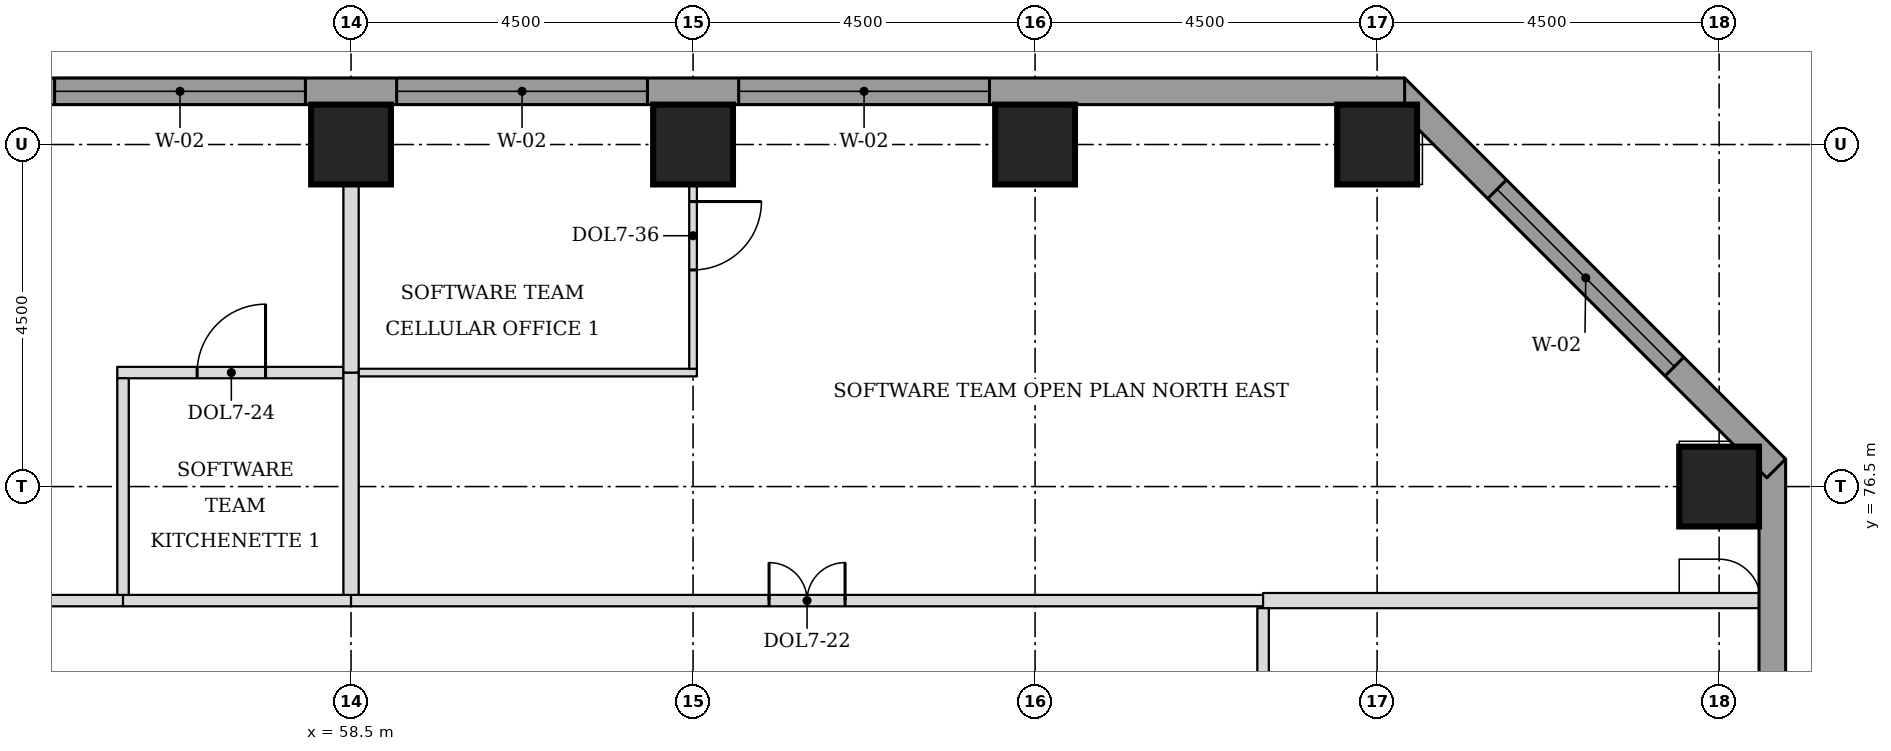
"""IFC4 building model, lengths in metres.
Left out: names, types, materials, properties, quantities, classifications, styles, units other than length and angle.
Written with IfcOpenShell. Run it as: python <this file> out.ifc"""

import sys

from ifc_helpers import new_model, si_unit, direction, frame, frame_2d, origin, origin_2d, place, context, subcontext, project, spatial, rectangle, extrude, element, fill, save


model = new_model("IFC4")
c1 = context("Model", 3, precision=1e-05, world=origin(), true_north=direction((0.0, 1.0)))
c2 = subcontext(c1, "Body", "Model", "MODEL_VIEW")
j1 = project(units=[si_unit("LENGTHUNIT", "METRE"), si_unit("PLANEANGLEUNIT", "RADIAN")], contexts=[c1])
p1 = place(None, origin())
s1 = spatial("IfcSite", under=j1, at=p1, CompositionType="ELEMENT")
p2 = place(p1, origin())
s2 = spatial("IfcBuilding", under=s1, at=p2, CompositionType="ELEMENT")
p3 = place(p2, frame((0.0, 0.0, 127.0)))
s3 = spatial("IfcBuildingStorey", under=s2, at=p3, CompositionType="ELEMENT", Elevation=127.0)
for number, where, z_axis, x_axis in (
    (1, (76.5, 76.5, 0.0), (0.0, 0.0, 1.0), (1.0, 0.0, 0.0)),
    (2, (58.5, 81.0, 0.0), (0.0, 0.0, 1.0), (1.0, 0.0, 0.0)),
    (3, (63.0, 81.0, 0.0), (0.0, 0.0, 1.0), (1.0, 0.0, 0.0)),
    (4, (67.5, 81.0, 0.0), (0.0, 0.0, 1.0), (1.0, 0.0, 0.0)),
    (5, (72.0, 81.0, 0.0), (0.0, 0.0, 1.0), (1.0, 0.0, 0.0)),
):
    element("IfcColumn", number, at=place(p3, frame(where, z_axis=z_axis, x_axis=x_axis)), inside=s3, PredefinedType="COLUMN", context=c2, shape_type="SweptSolid", body=[
        extrude(rectangle(XDim=1.05, YDim=1.05, at=origin_2d()), origin(), (0.0, 0.0, 1.0), 3.7),
    ])
p4 = place(p3, frame((77.2, 44.638, 0.0), z_axis=(0.0, 0.0, 1.0), x_axis=(0.0, 1.0, 0.0)))
e6 = element("IfcWall", 6, at=p4, inside=s3, PredefinedType="STANDARD", context=c2, shape_type="SweptSolid", body=[
    extrude(rectangle(XDim=32.225, YDim=0.35, at=frame_2d((16.112, 0.0))), origin(), (0.0, 0.0, 1.0), 3.525),
])
p5 = place(p4, frame((5.462, 0.0, 0.9)))
e7 = element("IfcOpeningElement", 7, at=p5, cuts=e6, PredefinedType="OPENING", context=c2, shape_type="SweptSolid", body=[
    extrude(rectangle(XDim=3.3, YDim=1.9, at=frame_2d((1.65, 0.95))), frame((0.0, 0.185, 0.0), z_axis=(0.0, -1.0, 0.0), x_axis=(1.0, 0.0, 0.0)), (0.0, 0.0, 1.0), 0.37),
])
p6 = place(p4, frame((9.962, 0.0, 0.9)))
e8 = element("IfcOpeningElement", 8, at=p6, cuts=e6, PredefinedType="OPENING", context=c2, shape_type="SweptSolid", body=[
    extrude(rectangle(XDim=3.3, YDim=1.9, at=frame_2d((1.65, 0.95))), frame((0.0, 0.185, 0.0), z_axis=(0.0, -1.0, 0.0), x_axis=(1.0, 0.0, 0.0)), (0.0, 0.0, 1.0), 0.37),
])
p7 = place(p4, frame((14.462, 0.0, 0.9)))
e9 = element("IfcOpeningElement", 9, at=p7, cuts=e6, PredefinedType="OPENING", context=c2, shape_type="SweptSolid", body=[
    extrude(rectangle(XDim=3.3, YDim=1.9, at=frame_2d((1.65, 0.95))), frame((0.0, 0.185, 0.0), z_axis=(0.0, -1.0, 0.0), x_axis=(1.0, 0.0, 0.0)), (0.0, 0.0, 1.0), 0.37),
])
p8 = place(p4, frame((18.962, 0.0, 0.9)))
e10 = element("IfcOpeningElement", 10, at=p8, cuts=e6, PredefinedType="OPENING", context=c2, shape_type="SweptSolid", body=[
    extrude(rectangle(XDim=3.3, YDim=1.9, at=frame_2d((1.65, 0.95))), frame((0.0, 0.185, 0.0), z_axis=(0.0, -1.0, 0.0), x_axis=(1.0, 0.0, 0.0)), (0.0, 0.0, 1.0), 0.37),
])
p9 = place(p4, frame((23.462, 0.0, 0.9)))
e11 = element("IfcOpeningElement", 11, at=p9, cuts=e6, PredefinedType="OPENING", context=c2, shape_type="SweptSolid", body=[
    extrude(rectangle(XDim=3.3, YDim=1.9, at=frame_2d((1.65, 0.95))), frame((0.0, 0.185, 0.0), z_axis=(0.0, -1.0, 0.0), x_axis=(1.0, 0.0, 0.0)), (0.0, 0.0, 1.0), 0.37),
])
p10 = place(p3, frame((77.251, 76.739, 0.0), z_axis=(0.0, 0.0, 1.0), x_axis=(-0.707106781187, 0.707106781187, 0.0)))
e12 = element("IfcWall", 12, at=p10, inside=s3, PredefinedType="STANDARD", context=c2, shape_type="SweptSolid", body=[
    extrude(rectangle(XDim=7.089, YDim=0.35, at=frame_2d((3.544, 0.0))), origin(), (0.0, 0.0, 1.0), 3.525),
])
p11 = place(p10, frame((1.894, 0.0, 0.9)))
e13 = element("IfcOpeningElement", 13, at=p11, cuts=e12, PredefinedType="OPENING", context=c2, shape_type="SweptSolid", body=[
    extrude(rectangle(XDim=3.3, YDim=1.9, at=frame_2d((1.65, 0.95))), frame((0.0, 0.185, 0.0), z_axis=(0.0, -1.0, 0.0), x_axis=(1.0, 0.0, 0.0)), (0.0, 0.0, 1.0), 0.37),
])
p12 = place(p3, frame((72.362, 81.7, 0.0), z_axis=(0.0, 0.0, 1.0), x_axis=(-1.0, 0.0, 0.0)))
e14 = element("IfcWall", 14, at=p12, inside=s3, PredefinedType="STANDARD", context=c2, shape_type="SweptSolid", body=[
    extrude(rectangle(XDim=32.225, YDim=0.35, at=frame_2d((16.112, 0.0))), origin(), (0.0, 0.0, 1.0), 3.525),
])
p13 = place(p12, frame((5.462, 0.0, 0.9)))
e15 = element("IfcOpeningElement", 15, at=p13, cuts=e14, PredefinedType="OPENING", context=c2, shape_type="SweptSolid", body=[
    extrude(rectangle(XDim=3.3, YDim=1.9, at=frame_2d((1.65, 0.95))), frame((0.0, 0.185, 0.0), z_axis=(0.0, -1.0, 0.0), x_axis=(1.0, 0.0, 0.0)), (0.0, 0.0, 1.0), 0.37),
])
p14 = place(p12, frame((9.962, 0.0, 0.9)))
e16 = element("IfcOpeningElement", 16, at=p14, cuts=e14, PredefinedType="OPENING", context=c2, shape_type="SweptSolid", body=[
    extrude(rectangle(XDim=3.3, YDim=1.9, at=frame_2d((1.65, 0.95))), frame((0.0, 0.185, 0.0), z_axis=(0.0, -1.0, 0.0), x_axis=(1.0, 0.0, 0.0)), (0.0, 0.0, 1.0), 0.37),
])
p15 = place(p12, frame((14.462, 0.0, 0.9)))
e17 = element("IfcOpeningElement", 17, at=p15, cuts=e14, PredefinedType="OPENING", context=c2, shape_type="SweptSolid", body=[
    extrude(rectangle(XDim=3.3, YDim=1.9, at=frame_2d((1.65, 0.95))), frame((0.0, 0.185, 0.0), z_axis=(0.0, -1.0, 0.0), x_axis=(1.0, 0.0, 0.0)), (0.0, 0.0, 1.0), 0.37),
])
p16 = place(p12, frame((18.962, 0.0, 0.9)))
e18 = element("IfcOpeningElement", 18, at=p16, cuts=e14, PredefinedType="OPENING", context=c2, shape_type="SweptSolid", body=[
    extrude(rectangle(XDim=3.3, YDim=1.9, at=frame_2d((1.65, 0.95))), frame((0.0, 0.185, 0.0), z_axis=(0.0, -1.0, 0.0), x_axis=(1.0, 0.0, 0.0)), (0.0, 0.0, 1.0), 0.37),
])
p17 = place(p12, frame((23.462, 0.0, 0.9)))
e19 = element("IfcOpeningElement", 19, at=p17, cuts=e14, PredefinedType="OPENING", context=c2, shape_type="SweptSolid", body=[
    extrude(rectangle(XDim=3.3, YDim=1.9, at=frame_2d((1.65, 0.95))), frame((0.0, 0.185, 0.0), z_axis=(0.0, -1.0, 0.0), x_axis=(1.0, 0.0, 0.0)), (0.0, 0.0, 1.0), 0.37),
])
p18 = place(p3, frame((46.5, 75.0, 0.0), z_axis=(0.0, 0.0, 1.0), x_axis=(1.0, 0.0, 0.0)))
e20 = element("IfcWall", 20, at=p18, inside=s3, PredefinedType="PARTITIONING", context=c2, shape_type="SweptSolid", body=[
    extrude(rectangle(XDim=9.0, YDim=0.15, at=frame_2d((4.5, 0.0))), origin(), (0.0, 0.0, 1.0), 3.55),
])
p19 = place(p3, frame((55.5, 75.0, 0.0), z_axis=(0.0, 0.0, 1.0), x_axis=(1.0, 0.0, 0.0)))
e21 = element("IfcWall", 21, at=p19, inside=s3, PredefinedType="PARTITIONING", context=c2, shape_type="SweptSolid", body=[
    extrude(rectangle(XDim=3.0, YDim=0.15, at=frame_2d((1.5, 0.0))), origin(), (0.0, 0.0, 1.0), 3.55),
])
p20 = place(p3, frame((58.5, 75.0, 0.0), z_axis=(0.0, 0.0, 1.0), x_axis=(1.0, 0.0, 0.0)))
e22 = element("IfcWall", 22, at=p20, inside=s3, PredefinedType="PARTITIONING", context=c2, shape_type="SweptSolid", body=[
    extrude(rectangle(XDim=12.0, YDim=0.15, at=frame_2d((6.0, 0.0))), origin(), (0.0, 0.0, 1.0), 3.55),
])
p21 = place(p20, frame((5.5, 0.0, 0.0)))
e23 = element("IfcOpeningElement", 23, at=p21, cuts=e22, PredefinedType="OPENING", context=c2, shape_type="SweptSolid", body=[
    extrude(rectangle(XDim=1.0, YDim=2.1, at=frame_2d((0.5, 1.05))), frame((0.0, 0.085, 0.0), z_axis=(0.0, -1.0, 0.0), x_axis=(1.0, 0.0, 0.0)), (0.0, 0.0, 1.0), 0.17),
])
p22 = place(p3, frame((70.5, 75.0, 0.0), z_axis=(0.0, 0.0, 1.0), x_axis=(1.0, 0.0, 0.0)))
e24 = element("IfcWall", 24, at=p22, inside=s3, PredefinedType="PARTITIONING", context=c2, shape_type="SweptSolid", body=[
    extrude(rectangle(XDim=6.525, YDim=0.2, at=frame_2d((3.262, 0.0))), origin(), (0.0, 0.0, 1.0), 3.55),
])
p23 = place(p3, frame((55.425, 78.0, 0.0), z_axis=(0.0, 0.0, 1.0), x_axis=(1.0, 0.0, 0.0)))
e25 = element("IfcWall", 25, at=p23, inside=s3, PredefinedType="PARTITIONING", context=c2, shape_type="SweptSolid", body=[
    extrude(rectangle(XDim=2.975, YDim=0.15, at=frame_2d((1.487, 0.0))), origin(), (0.0, 0.0, 1.0), 3.55),
])
p24 = place(p23, frame((1.05, 0.0, 0.0)))
e26 = element("IfcOpeningElement", 26, at=p24, cuts=e25, PredefinedType="OPENING", context=c2, shape_type="SweptSolid", body=[
    extrude(rectangle(XDim=0.9, YDim=2.1, at=frame_2d((0.45, 1.05))), frame((0.0, 0.085, 0.0), z_axis=(0.0, -1.0, 0.0), x_axis=(1.0, 0.0, 0.0)), (0.0, 0.0, 1.0), 0.17),
])
p25 = place(p3, frame((58.6, 78.0, 0.0), z_axis=(0.0, 0.0, 1.0), x_axis=(1.0, 0.0, 0.0)))
e27 = element("IfcWall", 27, at=p25, inside=s3, PredefinedType="PARTITIONING", context=c2, shape_type="SweptSolid", body=[
    extrude(rectangle(XDim=4.45, YDim=0.1, at=frame_2d((2.225, 0.0))), origin(), (0.0, 0.0, 1.0), 3.55),
])
p26 = place(p3, frame((70.5, 63.0, 0.0), z_axis=(0.0, 0.0, 1.0), x_axis=(0.0, 1.0, 0.0)))
e28 = element("IfcWall", 28, at=p26, inside=s3, PredefinedType="PARTITIONING", context=c2, shape_type="SweptSolid", body=[
    extrude(rectangle(XDim=11.9, YDim=0.15, at=frame_2d((5.95, 0.0))), origin(), (0.0, 0.0, 1.0), 3.55),
])
p27 = place(p26, frame((5.45, 0.0, 0.0)))
e29 = element("IfcOpeningElement", 29, at=p27, cuts=e28, PredefinedType="OPENING", context=c2, shape_type="SweptSolid", body=[
    extrude(rectangle(XDim=1.0, YDim=2.1, at=frame_2d((0.5, 1.05))), frame((0.0, 0.085, 0.0), z_axis=(0.0, -1.0, 0.0), x_axis=(1.0, 0.0, 0.0)), (0.0, 0.0, 1.0), 0.17),
])
p28 = place(p3, frame((55.5, 75.075, 0.0), z_axis=(0.0, 0.0, 1.0), x_axis=(0.0, 1.0, 0.0)))
e30 = element("IfcWall", 30, at=p28, inside=s3, PredefinedType="PARTITIONING", context=c2, shape_type="SweptSolid", body=[
    extrude(rectangle(XDim=2.85, YDim=0.15, at=frame_2d((1.425, 0.0))), origin(), (0.0, 0.0, 1.0), 3.55),
])
p29 = place(p3, frame((58.5, 75.075, 0.0), z_axis=(0.0, 0.0, 1.0), x_axis=(0.0, 1.0, 0.0)))
e31 = element("IfcWall", 31, at=p29, inside=s3, PredefinedType="PARTITIONING", context=c2, shape_type="SweptSolid", body=[
    extrude(rectangle(XDim=2.925, YDim=0.2, at=frame_2d((1.462, 0.0))), origin(), (0.0, 0.0, 1.0), 3.55),
])
p30 = place(p3, frame((58.5, 78.0, 0.0), z_axis=(0.0, 0.0, 1.0), x_axis=(0.0, 1.0, 0.0)))
e32 = element("IfcWall", 32, at=p30, inside=s3, PredefinedType="PARTITIONING", context=c2, shape_type="SweptSolid", body=[
    extrude(rectangle(XDim=3.525, YDim=0.2, at=frame_2d((1.762, 0.0))), origin(), (0.0, 0.0, 1.0), 3.55),
])
p31 = place(p3, frame((63.0, 78.05, 0.0), z_axis=(0.0, 0.0, 1.0), x_axis=(0.0, 1.0, 0.0)))
e33 = element("IfcWall", 33, at=p31, inside=s3, PredefinedType="PARTITIONING", context=c2, shape_type="SweptSolid", body=[
    extrude(rectangle(XDim=3.475, YDim=0.1, at=frame_2d((1.737, 0.0))), origin(), (0.0, 0.0, 1.0), 3.55),
])
p32 = place(p31, frame((1.3, 0.0, 0.0)))
e34 = element("IfcOpeningElement", 34, at=p32, cuts=e33, PredefinedType="OPENING", context=c2, shape_type="SweptSolid", body=[
    extrude(rectangle(XDim=0.9, YDim=2.1, at=frame_2d((0.45, 1.05))), frame((0.0, 0.06, 0.0), z_axis=(0.0, -1.0, 0.0), x_axis=(1.0, 0.0, 0.0)), (0.0, 0.0, 1.0), 0.12),
])
p33 = place(p11, origin())
e35 = element("IfcWindow", 35, at=p33, inside=s3, PartitioningType="SINGLE_PANEL", PredefinedType="WINDOW", context=c2, shape_type="SweptSolid", body=[
    extrude(rectangle(XDim=3.3, YDim=1.9, at=frame_2d((1.65, 0.95))), frame((0.0, 0.085, 0.0), z_axis=(0.0, -1.0, 0.0), x_axis=(1.0, 0.0, 0.0)), (0.0, 0.0, 1.0), 0.06),
])
fill(e13, e35)
p34 = place(p13, origin())
e36 = element("IfcWindow", 36, at=p34, inside=s3, PartitioningType="SINGLE_PANEL", PredefinedType="WINDOW", context=c2, shape_type="SweptSolid", body=[
    extrude(rectangle(XDim=3.3, YDim=1.9, at=frame_2d((1.65, 0.95))), frame((0.0, 0.085, 0.0), z_axis=(0.0, -1.0, 0.0), x_axis=(1.0, 0.0, 0.0)), (0.0, 0.0, 1.0), 0.06),
])
fill(e15, e36)
p35 = place(p14, origin())
e37 = element("IfcWindow", 37, at=p35, inside=s3, PartitioningType="SINGLE_PANEL", PredefinedType="WINDOW", context=c2, shape_type="SweptSolid", body=[
    extrude(rectangle(XDim=3.3, YDim=1.9, at=frame_2d((1.65, 0.95))), frame((0.0, 0.085, 0.0), z_axis=(0.0, -1.0, 0.0), x_axis=(1.0, 0.0, 0.0)), (0.0, 0.0, 1.0), 0.06),
])
fill(e16, e37)
p36 = place(p15, origin())
e38 = element("IfcWindow", 38, at=p36, inside=s3, PartitioningType="SINGLE_PANEL", PredefinedType="WINDOW", context=c2, shape_type="SweptSolid", body=[
    extrude(rectangle(XDim=3.3, YDim=1.9, at=frame_2d((1.65, 0.95))), frame((0.0, 0.085, 0.0), z_axis=(0.0, -1.0, 0.0), x_axis=(1.0, 0.0, 0.0)), (0.0, 0.0, 1.0), 0.06),
])
fill(e17, e38)
p37 = place(p24, origin())
e39 = element("IfcDoor", 39, at=p37, inside=s3, OperationType="SINGLE_SWING_RIGHT", PredefinedType="DOOR", context=c2, shape_type="SweptSolid", body=[
    extrude(rectangle(XDim=0.9, YDim=2.1, at=frame_2d((0.45, 1.05))), frame((0.0, 0.025, 0.0), z_axis=(0.0, -1.0, 0.0), x_axis=(1.0, 0.0, 0.0)), (0.0, 0.0, 1.0), 0.05),
])
fill(e26, e39)
p38 = place(p21, origin())
e40 = element("IfcDoor", 40, at=p38, inside=s3, OperationType="DOUBLE_DOOR_SINGLE_SWING", PredefinedType="DOOR", context=c2, shape_type="SweptSolid", body=[
    extrude(rectangle(XDim=1.0, YDim=2.1, at=frame_2d((0.5, 1.05))), frame((0.0, 0.025, 0.0), z_axis=(0.0, -1.0, 0.0), x_axis=(1.0, 0.0, 0.0)), (0.0, 0.0, 1.0), 0.05),
])
fill(e23, e40)
p39 = place(p32, frame((0.9, 0.0, 0.0), z_axis=(0.0, 0.0, 1.0), x_axis=(-1.0, 0.0, 0.0)))
e41 = element("IfcDoor", 41, at=p39, inside=s3, OperationType="SINGLE_SWING_LEFT", PredefinedType="DOOR", context=c2, shape_type="SweptSolid", body=[
    extrude(rectangle(XDim=0.9, YDim=2.1, at=frame_2d((0.45, 1.05))), frame((0.0, 0.025, 0.0), z_axis=(0.0, -1.0, 0.0), x_axis=(1.0, 0.0, 0.0)), (0.0, 0.0, 1.0), 0.05),
])
fill(e34, e41)
save(model, sys.argv[1])
